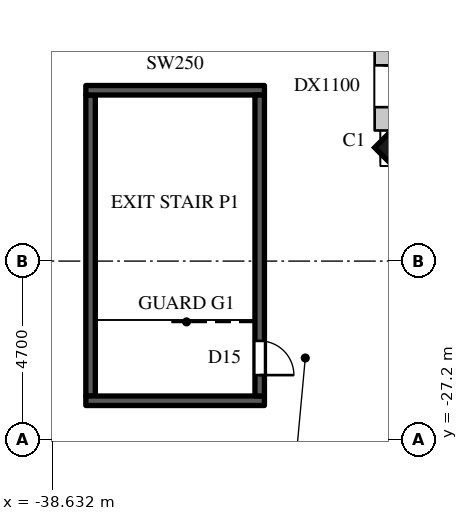
"""IFC4 building model, lengths in metres.
Left out: names, types, materials, properties, quantities, classifications, styles, units other than length and angle.
Written with IfcOpenShell. Run it as: python <this file> out.ifc"""

import sys

from ifc_helpers import new_model, si_unit, direction, frame, frame_2d, origin, origin_2d, place, context, subcontext, project, spatial, rectangle, extrude, element, fill, save


model = new_model("IFC4")
c1 = context("Model", 3, precision=1e-05, world=origin(), true_north=direction((0.0, 1.0)))
c2 = subcontext(c1, "Body", "Model", "MODEL_VIEW")
j1 = project(units=[si_unit("LENGTHUNIT", "METRE"), si_unit("PLANEANGLEUNIT", "RADIAN")], contexts=[c1])
p1 = place(None, origin())
s1 = spatial("IfcSite", under=j1, at=p1, CompositionType="ELEMENT")
p2 = place(p1, origin())
s2 = spatial("IfcBuilding", under=s1, at=p2, CompositionType="ELEMENT")
p3 = place(p2, frame((0.0, 0.0, 50.0)))
s3 = spatial("IfcBuildingStorey", under=s2, at=p3, CompositionType="ELEMENT", Elevation=50.0)
p4 = place(p3, frame((-29.337, -19.337, 0.0), z_axis=(0.0, 0.0, 1.0), x_axis=(0.707106781187, -0.707106781187, 0.0)))
e1 = element("IfcColumn", 1, at=p4, inside=s3, PredefinedType="COLUMN", context=c2, shape_type="SweptSolid", body=[
    extrude(rectangle(XDim=0.9, YDim=1.4, at=origin_2d()), origin(), (0.0, 0.0, 1.0), 5.5),
])
p5 = place(p3, frame((-29.925, -16.0, 0.0), z_axis=(0.0, 0.0, 1.0), x_axis=(0.0, -1.0, 0.0)))
e2 = element("IfcWall", 2, at=p5, inside=s3, PredefinedType="SOLIDWALL", context=c2, shape_type="SweptSolid", body=[
    extrude(rectangle(XDim=3.064, YDim=0.45, at=frame_2d((1.532, 0.0))), origin(), (0.0, 0.0, 1.0), 5.2),
])
p6 = place(p5, frame((1.35, 0.0, 0.0)))
e3 = element("IfcOpeningElement", 3, at=p6, cuts=e2, PredefinedType="OPENING", context=c2, shape_type="SweptSolid", body=[
    extrude(rectangle(XDim=1.1, YDim=2.4, at=frame_2d((0.55, 1.2))), frame((0.0, 0.235, 0.0), z_axis=(0.0, -1.0, 0.0), x_axis=(1.0, 0.0, 0.0)), (0.0, 0.0, 1.0), 0.47),
])
p7 = place(p3, frame((-37.625, -26.05, 0.0), z_axis=(0.0, 0.0, 1.0), x_axis=(0.0, 1.0, 0.0)))
e4 = element("IfcWall", 4, at=p7, inside=s3, PredefinedType="SHEAR", context=c2, shape_type="SweptSolid", body=[
    extrude(rectangle(XDim=7.92, YDim=0.25, at=frame_2d((3.96, 0.0))), origin(), (0.0, 0.0, 1.0), 4.1),
])
for number, where, z_axis, x_axis in (
    (5, (-37.75, -26.175, 0.0), (0.0, 0.0, 1.0), (1.0, 0.0, 0.0)),
    (6, (-37.75, -18.005, 0.0), (0.0, 0.0, 1.0), (1.0, 0.0, 0.0)),
):
    element("IfcWall", number, at=place(p3, frame(where, z_axis=z_axis, x_axis=x_axis)), inside=s3, PredefinedType="SHEAR", context=c2, shape_type="SweptSolid", body=[
        extrude(rectangle(XDim=4.7, YDim=0.25, at=frame_2d((2.35, 0.0))), origin(), (0.0, 0.0, 1.0), 4.1),
    ])
p8 = place(p3, frame((-33.175, -26.05, 0.0), z_axis=(0.0, 0.0, 1.0), x_axis=(0.0, 1.0, 0.0)))
e7 = element("IfcWall", 7, at=p8, inside=s3, PredefinedType="SHEAR", context=c2, shape_type="SweptSolid", body=[
    extrude(rectangle(XDim=7.92, YDim=0.25, at=frame_2d((3.96, 0.0))), origin(), (0.0, 0.0, 1.0), 4.1),
])
p9 = place(p8, frame((0.55, 0.0, 0.0)))
e8 = element("IfcOpeningElement", 8, at=p9, cuts=e7, PredefinedType="OPENING", context=c2, shape_type="SweptSolid", body=[
    extrude(rectangle(XDim=0.9, YDim=2.2, at=frame_2d((0.45, 1.1))), frame((0.0, 0.135, 0.0), z_axis=(0.0, -1.0, 0.0), x_axis=(1.0, 0.0, 0.0)), (0.0, 0.0, 1.0), 0.27),
])
p10 = place(p6, origin())
e9 = element("IfcDoor", 9, at=p10, inside=s3, OperationType="SINGLE_SWING_LEFT", PredefinedType="DOOR", context=c2, shape_type="SweptSolid", body=[
    extrude(rectangle(XDim=1.1, YDim=2.4, at=frame_2d((0.55, 1.2))), frame((0.0, 0.025, 0.0), z_axis=(0.0, -1.0, 0.0), x_axis=(1.0, 0.0, 0.0)), (0.0, 0.0, 1.0), 0.05),
])
fill(e3, e9)
p11 = place(p9, origin())
e10 = element("IfcDoor", 10, at=p11, inside=s3, OperationType="SINGLE_SWING_RIGHT", PredefinedType="DOOR", context=c2, shape_type="SweptSolid", body=[
    extrude(rectangle(XDim=0.9, YDim=2.2, at=frame_2d((0.45, 1.1))), frame((0.0, 0.025, 0.0), z_axis=(0.0, -1.0, 0.0), x_axis=(1.0, 0.0, 0.0)), (0.0, 0.0, 1.0), 0.05),
])
fill(e8, e10)
save(model, sys.argv[1])
